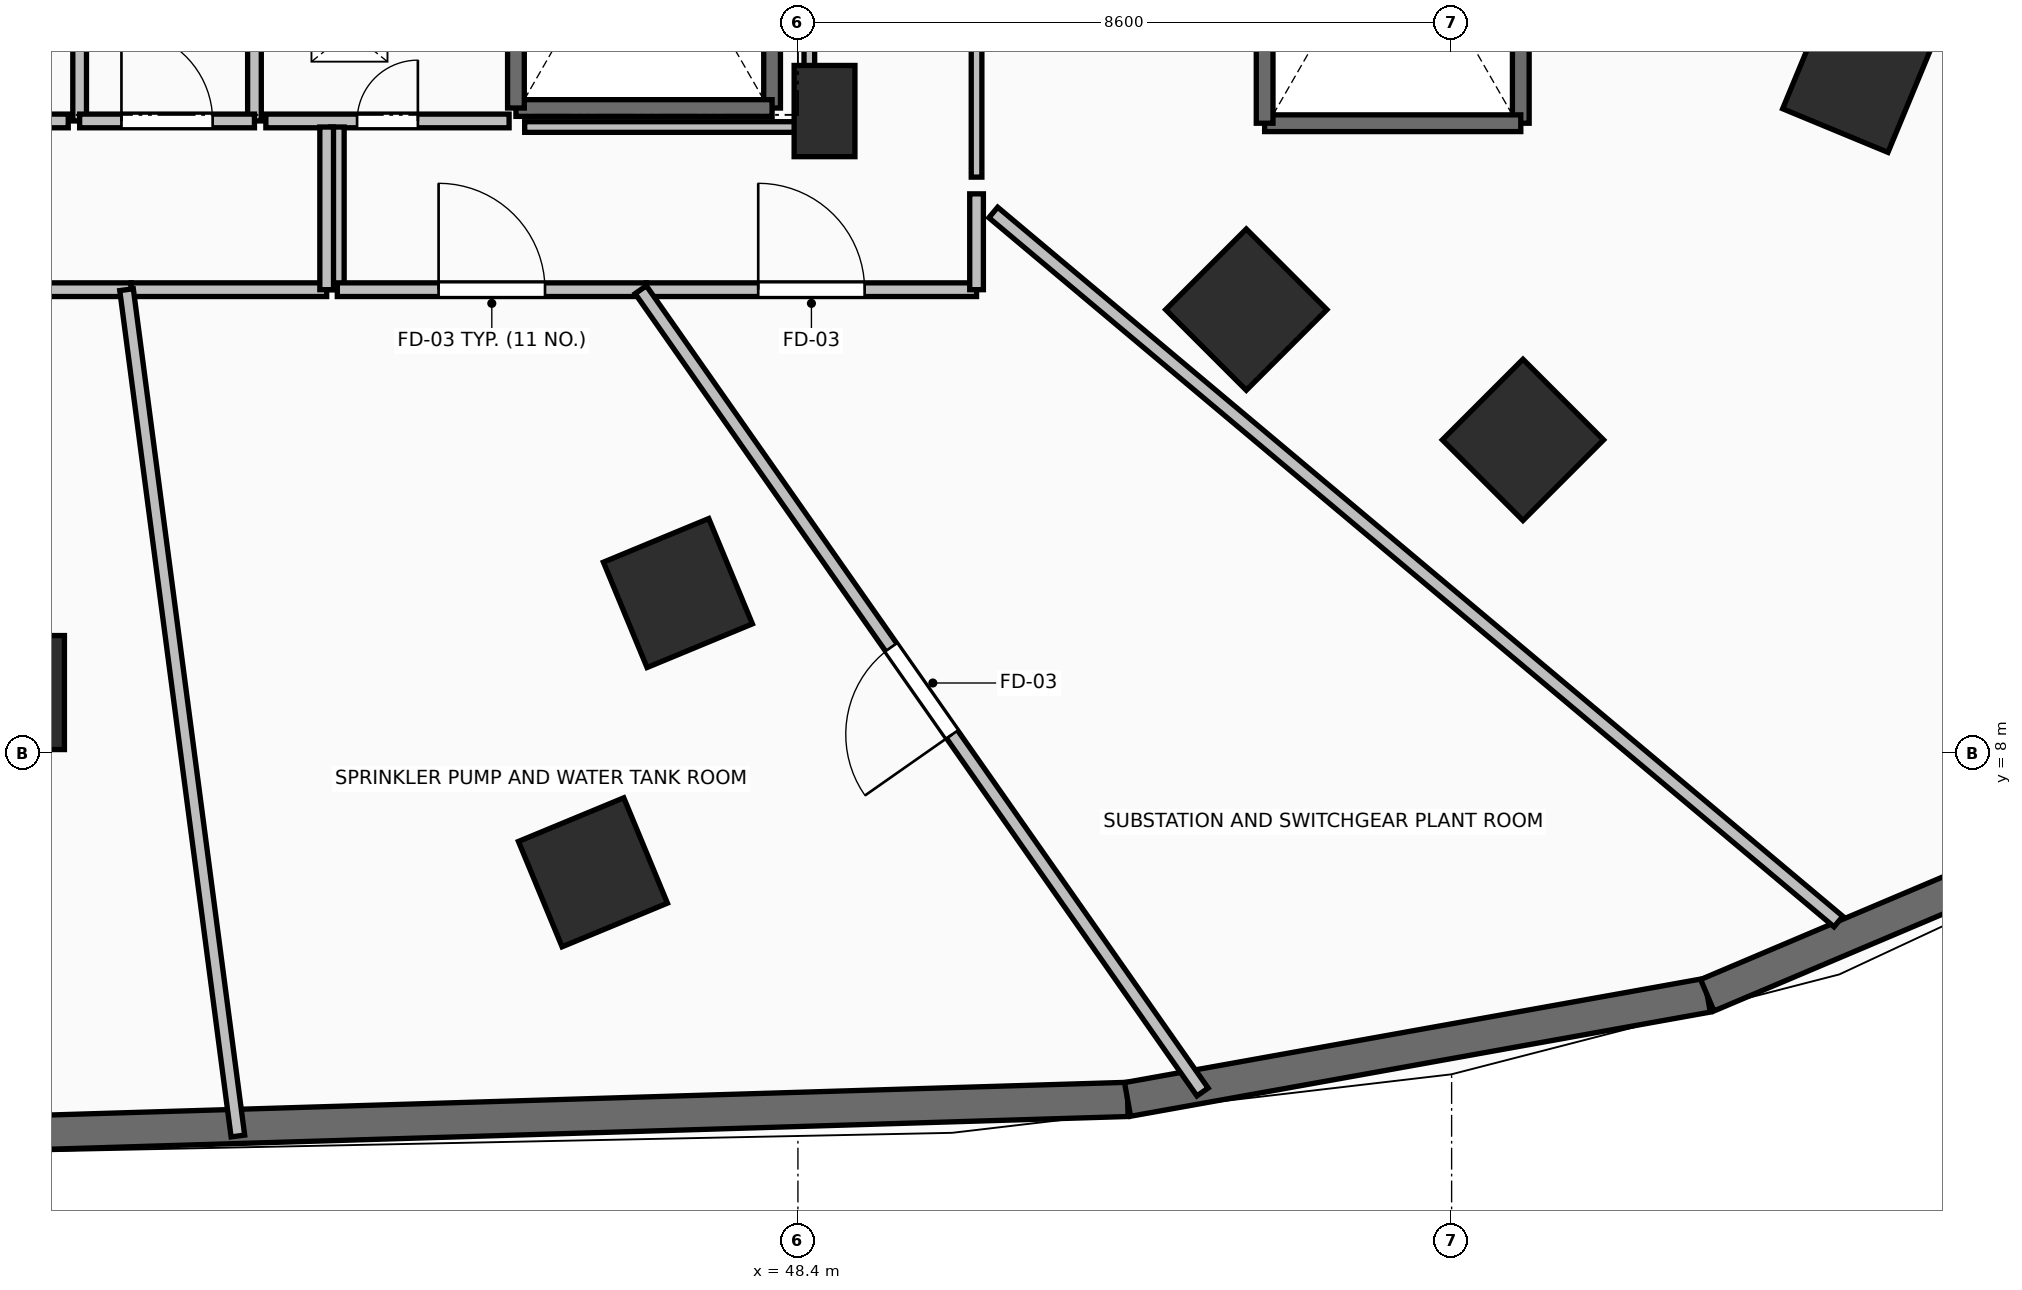
"""IFC4 building model, lengths in metres.
Left out: names, types, materials, properties, quantities, classifications, styles, units other than length and angle.
Written with IfcOpenShell. Run it as: python <this file> out.ifc"""

import sys

from ifc_helpers import new_model, si_unit, direction, frame, frame_2d, origin, origin_2d, place, context, subcontext, project, spatial, rectangle, extrude, element, fill, save


model = new_model("IFC4")
c1 = context("Model", 3, precision=1e-05, world=origin(), true_north=direction((0.0, 1.0)))
c2 = subcontext(c1, "Body", "Model", "MODEL_VIEW")
j1 = project(units=[si_unit("LENGTHUNIT", "METRE"), si_unit("PLANEANGLEUNIT", "RADIAN")], contexts=[c1])
p1 = place(None, origin())
s1 = spatial("IfcSite", under=j1, at=p1, CompositionType="ELEMENT")
p2 = place(p1, origin())
s2 = spatial("IfcBuilding", under=s1, at=p2, CompositionType="ELEMENT")
p3 = place(p2, frame((0.0, 0.0, -4.8)))
s3 = spatial("IfcBuildingStorey", under=s2, at=p3, CompositionType="ELEMENT", Elevation=-4.8)
for number, where, z_axis, x_axis in (
    (1, (38.0, 8.8, 0.0), (0.0, 0.0, 1.0), (0.0, -1.0, 0.0)),
    (2, (46.821, 10.109, 0.0), (0.0, 0.0, 1.0), (0.383, -0.924, 0.0)),
    (3, (54.299, 13.838, 0.0), (0.0, 0.0, 1.0), (0.707, -0.707, 0.0)),
    (4, (45.703, 6.435, 0.0), (0.0, 0.0, 1.0), (0.383, -0.924, 0.0)),
    (5, (57.939, 12.124, 0.0), (0.0, 0.0, 1.0), (0.707, -0.707, 0.0)),
    (6, (62.335, 16.886, 0.0), (0.0, 0.0, 1.0), (0.924, -0.383, 0.0)),
):
    element("IfcColumn", number, at=place(p3, frame(where, z_axis=z_axis, x_axis=x_axis)), inside=s3, PredefinedType="COLUMN", context=c2, shape_type="SweptSolid", body=[
        extrude(rectangle(XDim=1.5, YDim=1.5, at=origin_2d()), origin(), (0.0, 0.0, 1.0), 4.8),
    ])
p4 = place(p3, frame((48.75, 16.45, 0.0), z_axis=(0.0, 0.0, 1.0), x_axis=(1.0, 0.0, 0.0)))
e7 = element("IfcColumn", 7, at=p4, inside=s3, PredefinedType="PILASTER", context=c2, shape_type="SweptSolid", body=[
    extrude(rectangle(XDim=0.8, YDim=1.2, at=origin_2d()), origin(), (0.0, 0.0, 1.0), 4.8),
])
p5 = place(p3, frame((38.0, 3.0, 0.0), z_axis=(0.0, 0.0, 1.0), x_axis=(0.999540251976, 0.030319707786, 0.0)))
e8 = element("IfcWall", 8, at=p5, inside=s3, PredefinedType="SOLIDWALL", context=c2, shape_type="SweptSolid", body=[
    extrude(rectangle(XDim=14.744, YDim=0.45, at=frame_2d((7.372, 0.0))), origin(), (0.0, 0.0, 1.0), 4.46),
])
p6 = place(p3, frame((52.737, 3.447, 0.0), z_axis=(0.0, 0.0, 1.0), x_axis=(0.984238318617, 0.176847200051, 0.0)))
e9 = element("IfcWall", 9, at=p6, inside=s3, PredefinedType="SOLIDWALL", context=c2, shape_type="SweptSolid", body=[
    extrude(rectangle(XDim=7.749, YDim=0.45, at=frame_2d((3.875, 0.0))), origin(), (0.0, 0.0, 1.0), 4.46),
])
p7 = place(p3, frame((60.364, 4.818, 0.0), z_axis=(0.0, 0.0, 1.0), x_axis=(0.92081090532, 0.390009328919, 0.0)))
e10 = element("IfcWall", 10, at=p7, inside=s3, PredefinedType="SOLIDWALL", context=c2, shape_type="SweptSolid", body=[
    extrude(rectangle(XDim=6.102, YDim=0.45, at=frame_2d((3.051, 0.0))), origin(), (0.0, 0.0, 1.0), 4.46),
])
p8 = place(p3, frame((48.06, 23.91, 0.0), z_axis=(0.0, 0.0, 1.0), x_axis=(0.0, -1.0, 0.0)))
e11 = element("IfcWall", 11, at=p8, inside=s3, PredefinedType="SOLIDWALL", context=c2, shape_type="SweptSolid", body=[
    extrude(rectangle(XDim=7.42, YDim=0.22, at=frame_2d((3.71, 0.0))), origin(), (0.0, 0.0, 1.0), 4.46),
])
p9 = place(p3, frame((48.06, 16.49, 0.0), z_axis=(0.0, 0.0, 1.0), x_axis=(-1.0, 0.0, 0.0)))
e12 = element("IfcWall", 12, at=p9, inside=s3, PredefinedType="SOLIDWALL", context=c2, shape_type="SweptSolid", body=[
    extrude(rectangle(XDim=3.37, YDim=0.22, at=frame_2d((1.685, 0.0))), origin(), (0.0, 0.0, 1.0), 4.46),
])
for number, where, z_axis, x_axis in (
    (13, (44.69, 16.49, 0.0), (0.0, 0.0, 1.0), (0.0, 1.0, 0.0)),
    (14, (57.91, 23.71, 0.0), (0.0, 0.0, 1.0), (0.0, -1.0, 0.0)),
):
    element("IfcWall", number, at=place(p3, frame(where, z_axis=z_axis, x_axis=x_axis)), inside=s3, PredefinedType="SOLIDWALL", context=c2, shape_type="SweptSolid", body=[
        extrude(rectangle(XDim=7.42, YDim=0.22, at=frame_2d((3.71, 0.0))), origin(), (0.0, 0.0, 1.0), 4.46),
    ])
p10 = place(p3, frame((57.91, 16.29, 0.0), z_axis=(0.0, 0.0, 1.0), x_axis=(-1.0, 0.0, 0.0)))
e15 = element("IfcWall", 15, at=p10, inside=s3, PredefinedType="SOLIDWALL", context=c2, shape_type="SweptSolid", body=[
    extrude(rectangle(XDim=3.37, YDim=0.22, at=frame_2d((1.685, 0.0))), origin(), (0.0, 0.0, 1.0), 4.46),
])
p11 = place(p3, frame((54.54, 16.29, 0.0), z_axis=(0.0, 0.0, 1.0), x_axis=(0.0, 1.0, 0.0)))
e16 = element("IfcWall", 16, at=p11, inside=s3, PredefinedType="SOLIDWALL", context=c2, shape_type="SweptSolid", body=[
    extrude(rectangle(XDim=7.42, YDim=0.22, at=frame_2d((3.71, 0.0))), origin(), (0.0, 0.0, 1.0), 4.46),
])
p12 = place(p3, frame((38.95, 21.755, 0.0), z_axis=(0.0, 0.0, 1.0), x_axis=(0.0, -1.0, 0.0)))
e17 = element("IfcWall", 17, at=p12, inside=s3, PredefinedType="PARTITIONING", context=c2, shape_type="SweptSolid", body=[
    extrude(rectangle(XDim=5.435, YDim=0.18, at=frame_2d((2.717, 0.0))), origin(), (0.0, 0.0, 1.0), 4.46),
])
p13 = place(p12, frame((2.018, 0.0, 0.0)))
e18 = element("IfcOpeningElement", 18, at=p13, cuts=e17, PredefinedType="OPENING", context=c2, shape_type="SweptSolid", body=[
    extrude(rectangle(XDim=1.4, YDim=2.2, at=frame_2d((0.7, 1.1))), frame((0.0, 0.105, 0.0), z_axis=(0.0, -1.0, 0.0), x_axis=(1.0, 0.0, 0.0)), (0.0, 0.0, 1.0), 0.21),
])
p14 = place(p3, frame((41.25, 16.32, 0.0), z_axis=(0.0, 0.0, 1.0), x_axis=(0.0, 1.0, 0.0)))
e19 = element("IfcWall", 19, at=p14, inside=s3, PredefinedType="PARTITIONING", context=c2, shape_type="SweptSolid", body=[
    extrude(rectangle(XDim=2.785, YDim=0.18, at=frame_2d((1.393, 0.0))), origin(), (0.0, 0.0, 1.0), 4.46),
])
p15 = place(p14, frame((0.992, 0.0, 0.0)))
e20 = element("IfcOpeningElement", 20, at=p15, cuts=e19, PredefinedType="OPENING", context=c2, shape_type="SweptSolid", body=[
    extrude(rectangle(XDim=0.8, YDim=2.05, at=frame_2d((0.4, 1.025))), frame((0.0, 0.105, 0.0), z_axis=(0.0, -1.0, 0.0), x_axis=(1.0, 0.0, 0.0)), (0.0, 0.0, 1.0), 0.21),
])
p16 = place(p3, frame((38.95, 16.32, 0.0), z_axis=(0.0, 0.0, 1.0), x_axis=(1.0, 0.0, 0.0)))
e21 = element("IfcWall", 21, at=p16, inside=s3, PredefinedType="PARTITIONING", context=c2, shape_type="SweptSolid", body=[
    extrude(rectangle(XDim=2.3, YDim=0.18, at=frame_2d((1.15, 0.0))), origin(), (0.0, 0.0, 1.0), 4.46),
])
p17 = place(p16, frame((0.55, 0.0, 0.0)))
e22 = element("IfcOpeningElement", 22, at=p17, cuts=e21, PredefinedType="OPENING", context=c2, shape_type="SweptSolid", body=[
    extrude(rectangle(XDim=1.2, YDim=2.15, at=frame_2d((0.6, 1.075))), frame((0.0, 0.105, 0.0), z_axis=(0.0, -1.0, 0.0), x_axis=(1.0, 0.0, 0.0)), (0.0, 0.0, 1.0), 0.21),
])
p18 = place(p3, frame((31.4, 16.32, 0.0), z_axis=(0.0, 0.0, 1.0), x_axis=(1.0, 0.0, 0.0)))
e23 = element("IfcWall", 23, at=p18, inside=s3, PredefinedType="PARTITIONING", context=c2, shape_type="SweptSolid", body=[
    extrude(rectangle(XDim=7.4, YDim=0.18, at=frame_2d((3.7, 0.0))), origin(), (0.0, 0.0, 1.0), 4.46),
])
p19 = place(p18, frame((3.0, 0.0, 0.0)))
e24 = element("IfcOpeningElement", 24, at=p19, cuts=e23, PredefinedType="OPENING", context=c2, shape_type="SweptSolid", body=[
    extrude(rectangle(XDim=1.4, YDim=2.2, at=frame_2d((0.7, 1.1))), frame((0.0, 0.105, 0.0), z_axis=(0.0, -1.0, 0.0), x_axis=(1.0, 0.0, 0.0)), (0.0, 0.0, 1.0), 0.21),
])
p20 = place(p3, frame((41.4, 16.32, 0.0), z_axis=(0.0, 0.0, 1.0), x_axis=(1.0, 0.0, 0.0)))
e25 = element("IfcWall", 25, at=p20, inside=s3, PredefinedType="PARTITIONING", context=c2, shape_type="SweptSolid", body=[
    extrude(rectangle(XDim=3.2, YDim=0.18, at=frame_2d((1.6, 0.0))), origin(), (0.0, 0.0, 1.0), 4.46),
])
p21 = place(p20, frame((1.2, 0.0, 0.0)))
e26 = element("IfcOpeningElement", 26, at=p21, cuts=e25, PredefinedType="OPENING", context=c2, shape_type="SweptSolid", body=[
    extrude(rectangle(XDim=0.8, YDim=2.05, at=frame_2d((0.4, 1.025))), frame((0.0, 0.105, 0.0), z_axis=(0.0, -1.0, 0.0), x_axis=(1.0, 0.0, 0.0)), (0.0, 0.0, 1.0), 0.21),
])
p22 = place(p3, frame((33.131, 14.1, 0.0), z_axis=(0.0, 0.0, 1.0), x_axis=(1.0, 0.0, 0.0)))
e27 = element("IfcWall", 27, at=p22, inside=s3, PredefinedType="PARTITIONING", context=c2, shape_type="SweptSolid", body=[
    extrude(rectangle(XDim=6.497, YDim=0.18, at=frame_2d((3.249, 0.0))), origin(), (0.0, 0.0, 1.0), 4.46),
])
p23 = place(p22, frame((2.823, 0.0, 0.0)))
e28 = element("IfcOpeningElement", 28, at=p23, cuts=e27, PredefinedType="OPENING", context=c2, shape_type="SweptSolid", body=[
    extrude(rectangle(XDim=0.85, YDim=2.1, at=frame_2d((0.425, 1.05))), frame((0.0, 0.105, 0.0), z_axis=(0.0, -1.0, 0.0), x_axis=(1.0, 0.0, 0.0)), (0.0, 0.0, 1.0), 0.21),
])
p24 = place(p3, frame((42.34, 16.24, 0.0), z_axis=(0.0, 0.0, 1.0), x_axis=(0.0, -1.0, 0.0)))
e29 = element("IfcWall", 29, at=p24, inside=s3, PredefinedType="PARTITIONING", context=c2, shape_type="SweptSolid", body=[
    extrude(rectangle(XDim=2.14, YDim=0.18, at=frame_2d((1.07, 0.0))), origin(), (0.0, 0.0, 1.0), 4.46),
])
p25 = place(p3, frame((42.34, 14.1, 0.0), z_axis=(0.0, 0.0, 1.0), x_axis=(1.0, 0.0, 0.0)))
e30 = element("IfcWall", 30, at=p25, inside=s3, PredefinedType="PARTITIONING", context=c2, shape_type="SweptSolid", body=[
    extrude(rectangle(XDim=4.065, YDim=0.18, at=frame_2d((2.032, 0.0))), origin(), (0.0, 0.0, 1.0), 3.652),
])
p26 = place(p25, frame((1.333, 0.0, 0.0)))
e31 = element("IfcOpeningElement", 31, at=p26, cuts=e30, PredefinedType="OPENING", context=c2, shape_type="SweptSolid", body=[
    extrude(rectangle(XDim=1.4, YDim=2.2, at=frame_2d((0.7, 1.1))), frame((0.0, 0.105, 0.0), z_axis=(0.0, -1.0, 0.0), x_axis=(1.0, 0.0, 0.0)), (0.0, 0.0, 1.0), 0.21),
])
p27 = place(p3, frame((39.628, 14.1, 0.0), z_axis=(0.0, 0.0, 1.0), x_axis=(1.0, 0.0, 0.0)))
e32 = element("IfcWall", 32, at=p27, inside=s3, PredefinedType="PARTITIONING", context=c2, shape_type="SweptSolid", body=[
    extrude(rectangle(XDim=2.572, YDim=0.18, at=frame_2d((1.286, 0.0))), origin(), (0.0, 0.0, 1.0), 4.46),
])
p28 = place(p3, frame((42.2, 14.1, 0.0), z_axis=(0.0, 0.0, 1.0), x_axis=(0.0, 1.0, 0.0)))
e33 = element("IfcWall", 33, at=p28, inside=s3, PredefinedType="PARTITIONING", context=c2, shape_type="SweptSolid", body=[
    extrude(rectangle(XDim=2.14, YDim=0.18, at=frame_2d((1.07, 0.0))), origin(), (0.0, 0.0, 1.0), 4.46),
])
p29 = place(p3, frame((46.405, 14.1, 0.0), z_axis=(0.0, 0.0, 1.0), x_axis=(1.0, 0.0, 0.0)))
e34 = element("IfcWall", 34, at=p29, inside=s3, PredefinedType="PARTITIONING", context=c2, shape_type="SweptSolid", body=[
    extrude(rectangle(XDim=4.345, YDim=0.18, at=frame_2d((2.172, 0.0))), origin(), (0.0, 0.0, 1.0), 3.652),
])
p30 = place(p29, frame((1.472, 0.0, 0.0)))
e35 = element("IfcOpeningElement", 35, at=p30, cuts=e34, PredefinedType="OPENING", context=c2, shape_type="SweptSolid", body=[
    extrude(rectangle(XDim=1.4, YDim=2.2, at=frame_2d((0.7, 1.1))), frame((0.0, 0.105, 0.0), z_axis=(0.0, -1.0, 0.0), x_axis=(1.0, 0.0, 0.0)), (0.0, 0.0, 1.0), 0.21),
])
p31 = place(p3, frame((50.75, 14.1, 0.0), z_axis=(0.0, 0.0, 1.0), x_axis=(0.0, 1.0, 0.0)))
e36 = element("IfcWall", 36, at=p31, inside=s3, PredefinedType="PARTITIONING", context=c2, shape_type="SweptSolid", body=[
    extrude(rectangle(XDim=1.261, YDim=0.18, at=frame_2d((0.63, 0.0))), origin(), (0.0, 0.0, 1.0), 3.652),
])
p32 = place(p3, frame((41.032, 2.966, 0.0), z_axis=(0.0, 0.0, 1.0), x_axis=(-0.130461823369, 0.991453333568, 0.0)))
e37 = element("IfcWall", 37, at=p32, inside=s3, PredefinedType="PARTITIONING", context=c2, shape_type="SweptSolid", body=[
    extrude(rectangle(XDim=11.23, YDim=0.18, at=frame_2d((5.615, 0.0))), origin(), (0.0, 0.0, 1.0), 3.652),
])
p33 = place(p3, frame((53.723, 3.545, 0.0), z_axis=(0.0, 0.0, 1.0), x_axis=(-0.57357932605, 0.819150020892, 0.0)))
e38 = element("IfcWall", 38, at=p33, inside=s3, PredefinedType="PARTITIONING", context=c2, shape_type="SweptSolid", body=[
    extrude(rectangle(XDim=12.885, YDim=0.18, at=frame_2d((6.443, 0.0))), origin(), (0.0, 0.0, 1.0), 3.652),
])
p34 = place(p33, frame((5.743, 0.0, 0.0)))
e39 = element("IfcOpeningElement", 39, at=p34, cuts=e38, PredefinedType="OPENING", context=c2, shape_type="SweptSolid", body=[
    extrude(rectangle(XDim=1.4, YDim=2.2, at=frame_2d((0.7, 1.1))), frame((0.0, 0.105, 0.0), z_axis=(0.0, -1.0, 0.0), x_axis=(1.0, 0.0, 0.0)), (0.0, 0.0, 1.0), 0.21),
])
p35 = place(p3, frame((48.55, 23.754, 0.0), z_axis=(0.0, 0.0, 1.0), x_axis=(0.0, -1.0, 0.0)))
e40 = element("IfcWall", 40, at=p35, inside=s3, PredefinedType="PARTITIONING", context=c2, shape_type="SweptSolid", body=[
    extrude(rectangle(XDim=7.514, YDim=0.14, at=frame_2d((3.757, 0.0))), origin(), (0.0, 0.0, 1.0), 3.04),
])
p36 = place(p3, frame((48.55, 16.24, 0.0), z_axis=(0.0, 0.0, 1.0), x_axis=(-1.0, 0.0, 0.0)))
e41 = element("IfcWall", 41, at=p36, inside=s3, PredefinedType="PARTITIONING", context=c2, shape_type="SweptSolid", body=[
    extrude(rectangle(XDim=3.745, YDim=0.14, at=frame_2d((1.873, 0.0))), origin(), (0.0, 0.0, 1.0), 3.652),
])
p37 = place(p3, frame((50.75, 15.581, 0.0), z_axis=(0.0, 0.0, 1.0), x_axis=(0.0, 1.0, 0.0)))
e42 = element("IfcWall", 42, at=p37, inside=s3, PredefinedType="PARTITIONING", context=c2, shape_type="SweptSolid", body=[
    extrude(rectangle(XDim=10.139, YDim=0.14, at=frame_2d((5.069, 0.0))), origin(), (0.0, 0.0, 1.0), 3.652),
])
p38 = place(p3, frame((62.089, 5.787, 0.0), z_axis=(0.0, 0.0, 1.0), x_axis=(-0.766085470344, 0.642738712175, 0.0)))
e43 = element("IfcWall", 43, at=p38, inside=s3, PredefinedType="PARTITIONING", context=c2, shape_type="SweptSolid", body=[
    extrude(rectangle(XDim=14.514, YDim=0.18, at=frame_2d((7.257, 0.0))), origin(), (0.0, 0.0, 1.0), 3.652),
])
p39 = place(p17, origin())
e44 = element("IfcDoor", 44, at=p39, inside=s3, OperationType="SINGLE_SWING_LEFT", PredefinedType="DOOR", context=c2, shape_type="SweptSolid", body=[
    extrude(rectangle(XDim=1.2, YDim=2.15, at=frame_2d((0.6, 1.075))), frame((0.0, 0.025, 0.0), z_axis=(0.0, -1.0, 0.0), x_axis=(1.0, 0.0, 0.0)), (0.0, 0.0, 1.0), 0.05),
])
fill(e22, e44)
p40 = place(p21, origin())
e45 = element("IfcDoor", 45, at=p40, inside=s3, OperationType="SINGLE_SWING_RIGHT", PredefinedType="DOOR", context=c2, shape_type="SweptSolid", body=[
    extrude(rectangle(XDim=0.8, YDim=2.05, at=frame_2d((0.4, 1.025))), frame((0.0, 0.025, 0.0), z_axis=(0.0, -1.0, 0.0), x_axis=(1.0, 0.0, 0.0)), (0.0, 0.0, 1.0), 0.05),
])
fill(e26, e45)
p41 = place(p26, origin())
e46 = element("IfcDoor", 46, at=p41, inside=s3, OperationType="DOUBLE_SWING_LEFT", PredefinedType="DOOR", context=c2, shape_type="SweptSolid", body=[
    extrude(rectangle(XDim=1.4, YDim=2.2, at=frame_2d((0.7, 1.1))), frame((0.0, 0.025, 0.0), z_axis=(0.0, -1.0, 0.0), x_axis=(1.0, 0.0, 0.0)), (0.0, 0.0, 1.0), 0.05),
])
fill(e31, e46)
p42 = place(p30, origin())
e47 = element("IfcDoor", 47, at=p42, inside=s3, OperationType="DOUBLE_SWING_LEFT", PredefinedType="DOOR", context=c2, shape_type="SweptSolid", body=[
    extrude(rectangle(XDim=1.4, YDim=2.2, at=frame_2d((0.7, 1.1))), frame((0.0, 0.025, 0.0), z_axis=(0.0, -1.0, 0.0), x_axis=(1.0, 0.0, 0.0)), (0.0, 0.0, 1.0), 0.05),
])
fill(e35, e47)
p43 = place(p34, origin())
e48 = element("IfcDoor", 48, at=p43, inside=s3, OperationType="DOUBLE_SWING_LEFT", PredefinedType="DOOR", context=c2, shape_type="SweptSolid", body=[
    extrude(rectangle(XDim=1.4, YDim=2.2, at=frame_2d((0.7, 1.1))), frame((0.0, 0.025, 0.0), z_axis=(0.0, -1.0, 0.0), x_axis=(1.0, 0.0, 0.0)), (0.0, 0.0, 1.0), 0.05),
])
fill(e39, e48)
save(model, sys.argv[1])
